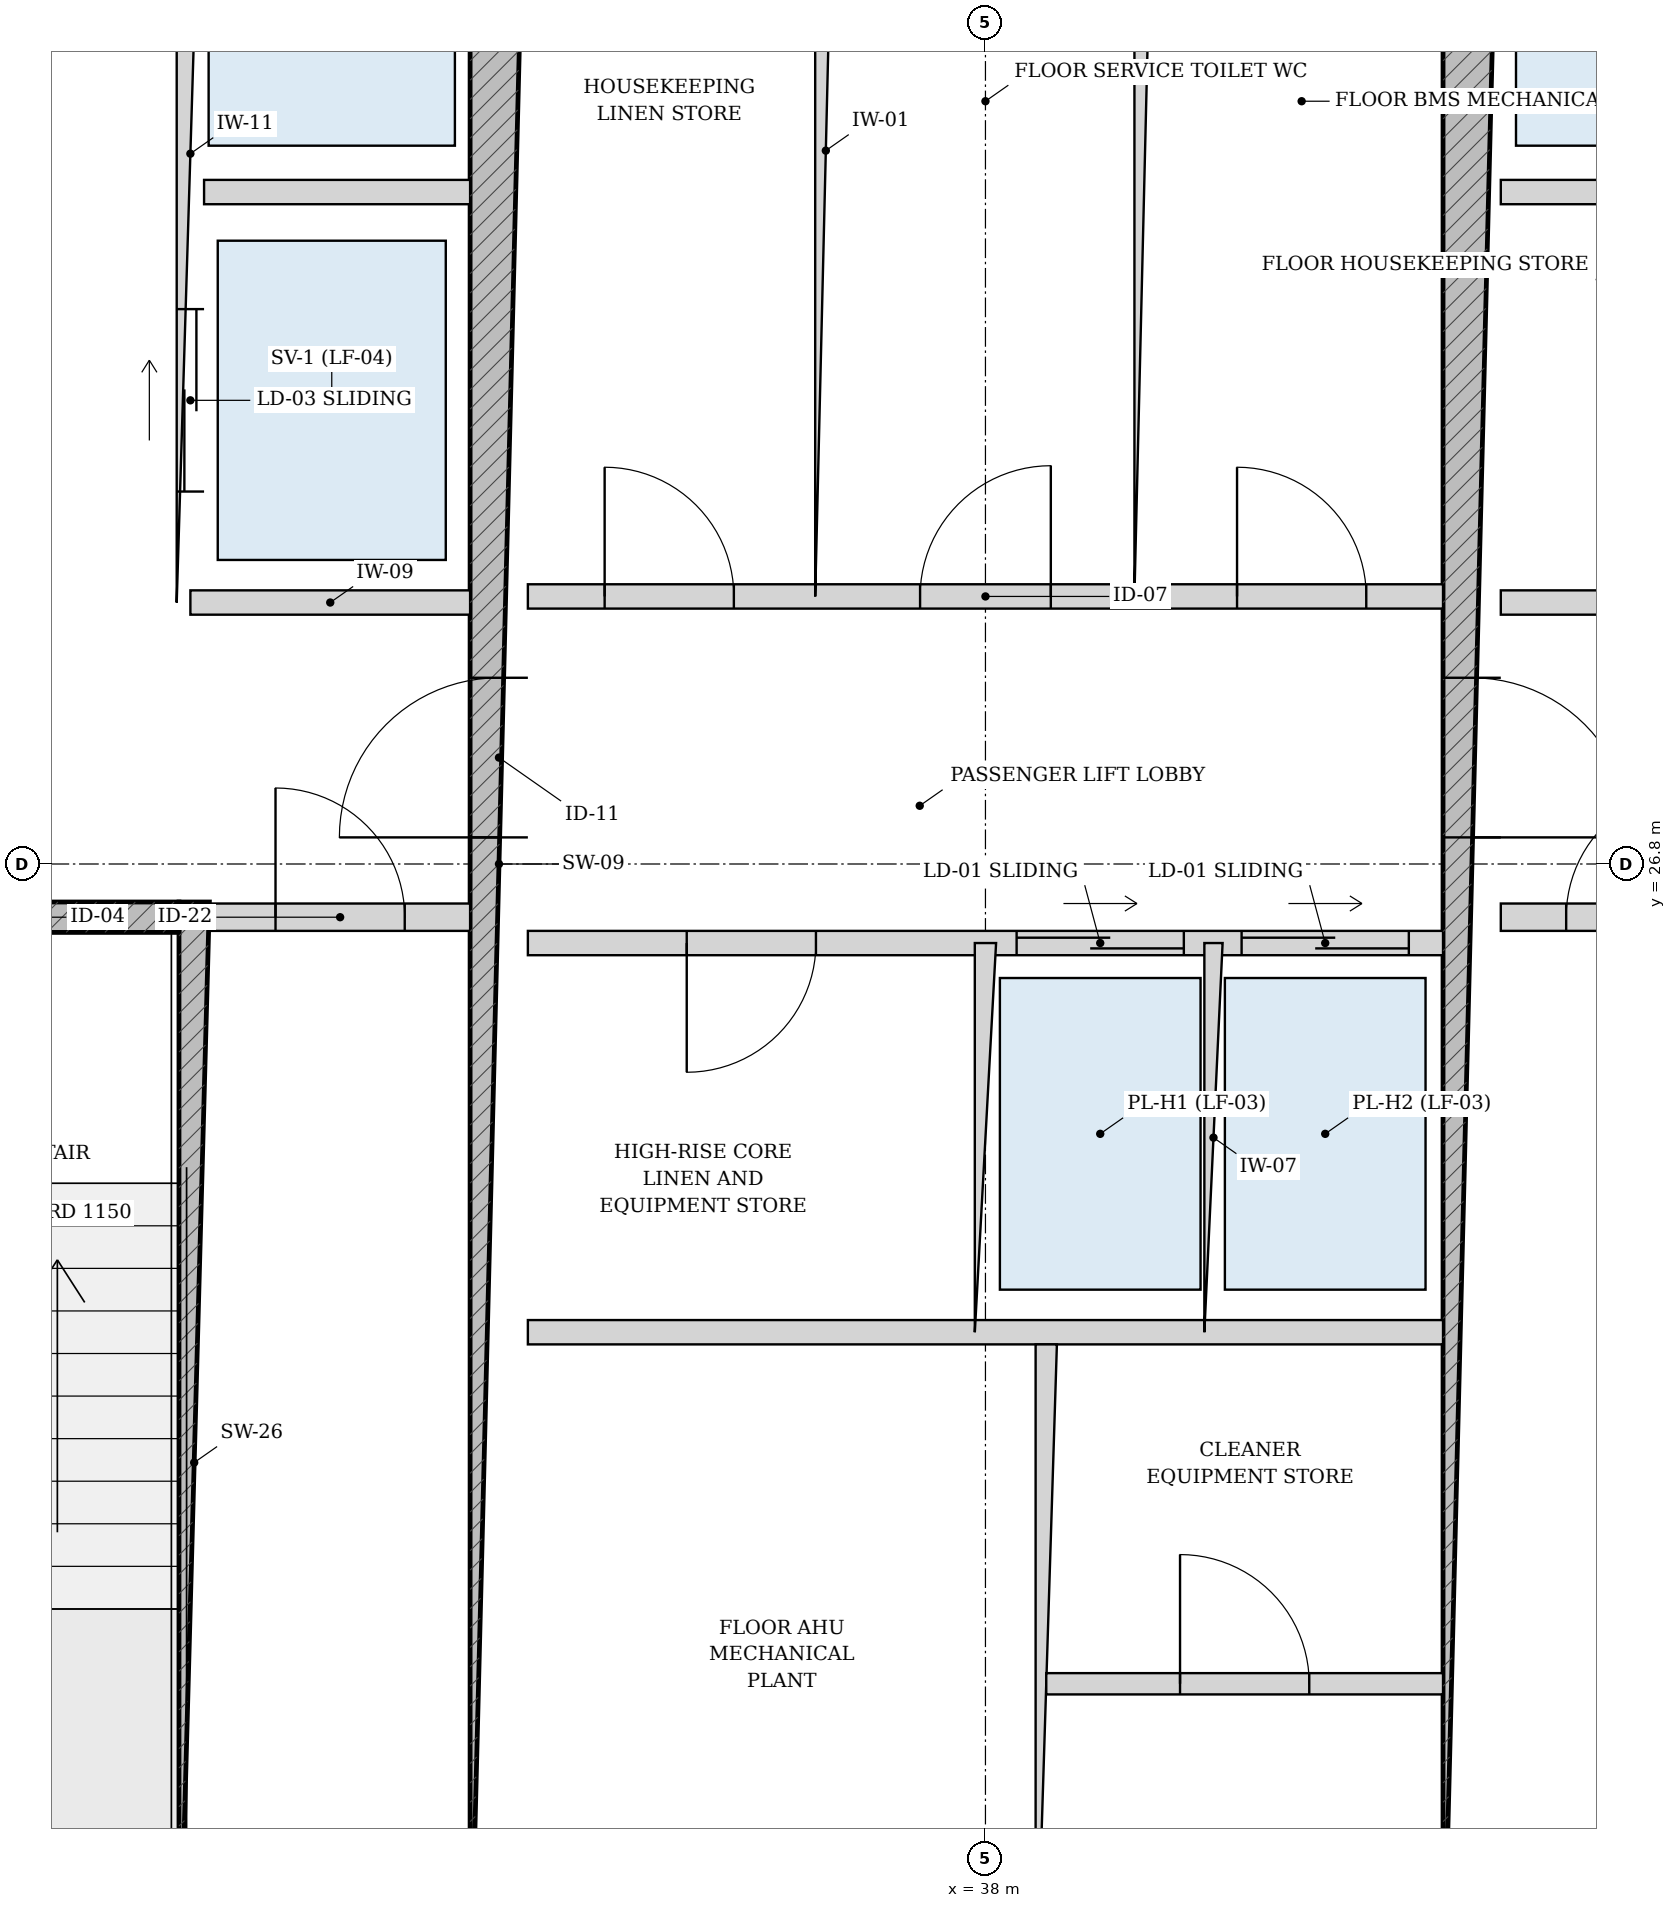
"""IFC4 building model, lengths in metres.
Left out: names, types, materials, properties, quantities, classifications, styles, units other than length and angle.
Written with IfcOpenShell. Run it as: python <this file> out.ifc"""

import sys

from ifc_helpers import new_model, si_unit, direction, frame, frame_2d, origin, place, context, subcontext, project, spatial, rectangle, extrude, source, transform, mapped, element, fill, save


model = new_model("IFC4")
c1 = context("Model", 3, precision=1e-05, world=origin(), true_north=direction((-0.2419218956, 0.970295726276)))
c2 = subcontext(c1, "Body", "Model", "MODEL_VIEW")
j1 = project(units=[si_unit("LENGTHUNIT", "METRE"), si_unit("PLANEANGLEUNIT", "RADIAN")], contexts=[c1])
p1 = place(None, origin())
s1 = spatial("IfcSite", under=j1, at=p1, CompositionType="ELEMENT")
p2 = place(p1, origin())
s2 = spatial("IfcBuilding", under=s1, at=p2, CompositionType="ELEMENT")
p3 = place(p2, frame((0.0, 0.0, 251.95)))
s3 = spatial("IfcBuildingStorey", under=s2, at=p3, CompositionType="ELEMENT", Elevation=251.95)
p4 = place(p3, frame((32.795, 19.175, 0.0), z_axis=(0.0, 0.0, 1.0), x_axis=(0.0, 1.0, 0.0)))
e1 = element("IfcWall", 1, at=p4, inside=s3, PredefinedType="SOLIDWALL", context=c2, shape_type="SweptSolid", body=[
    extrude(rectangle(XDim=7.375, YDim=0.2, at=frame_2d((3.688, 0.0))), origin(), (0.0, 0.0, 1.0), 3.49),
])
p5 = place(p3, frame((29.375, 26.45, 0.0), z_axis=(0.0, 0.0, 1.0), x_axis=(1.0, 0.0, 0.0)))
e2 = element("IfcWall", 2, at=p5, inside=s3, PredefinedType="SOLIDWALL", context=c2, shape_type="SweptSolid", body=[
    extrude(rectangle(XDim=3.32, YDim=0.2, at=frame_2d((1.66, 0.0))), origin(), (0.0, 0.0, 1.0), 3.49),
])
p6 = place(p5, frame((1.185, 0.0, 0.0)))
e3 = element("IfcOpeningElement", 3, at=p6, cuts=e2, PredefinedType="OPENING", context=c2, shape_type="SweptSolid", body=[
    extrude(rectangle(XDim=0.95, YDim=2.15, at=frame_2d((0.475, 1.075))), frame((0.0, 0.11, 0.0), z_axis=(0.0, -1.0, 0.0), x_axis=(1.0, 0.0, 0.0)), (0.0, 0.0, 1.0), 0.22),
])
p7 = place(p3, frame((34.8, 19.175, 0.0), z_axis=(0.0, 0.0, 1.0), x_axis=(0.0, 1.0, 0.0)))
e4 = element("IfcWall", 4, at=p7, inside=s3, PredefinedType="SHEAR", context=c2, shape_type="SweptSolid", body=[
    extrude(rectangle(XDim=15.25, YDim=0.38, at=frame_2d((7.625, 0.0))), origin(), (0.0, 0.0, 1.0), 3.49),
])
p8 = place(p7, frame((7.8, 0.0, 0.0)))
e5 = element("IfcOpeningElement", 5, at=p8, cuts=e4, PredefinedType="OPENING", context=c2, shape_type="SweptSolid", body=[
    extrude(rectangle(XDim=1.05, YDim=2.15, at=frame_2d((0.525, 1.075))), frame((0.0, 0.2, 0.0), z_axis=(0.0, -1.0, 0.0), x_axis=(1.0, 0.0, 0.0)), (0.0, 0.0, 1.0), 0.4),
])
p9 = place(p3, frame((41.2, 19.175, 0.0), z_axis=(0.0, 0.0, 1.0), x_axis=(0.0, 1.0, 0.0)))
e6 = element("IfcWall", 6, at=p9, inside=s3, PredefinedType="SHEAR", context=c2, shape_type="SweptSolid", body=[
    extrude(rectangle(XDim=15.25, YDim=0.38, at=frame_2d((7.625, 0.0))), origin(), (0.0, 0.0, 1.0), 3.49),
])
p10 = place(p9, frame((7.8, 0.0, 0.0)))
e7 = element("IfcOpeningElement", 7, at=p10, cuts=e6, PredefinedType="OPENING", context=c2, shape_type="SweptSolid", body=[
    extrude(rectangle(XDim=1.05, YDim=2.15, at=frame_2d((0.525, 1.075))), frame((0.0, 0.2, 0.0), z_axis=(0.0, -1.0, 0.0), x_axis=(1.0, 0.0, 0.0)), (0.0, 0.0, 1.0), 0.4),
])
p11 = place(p3, frame((32.9, 26.45, 0.0), z_axis=(0.0, 0.0, 1.0), x_axis=(1.0, 0.0, 0.0)))
e8 = element("IfcWall", 8, at=p11, inside=s3, PredefinedType="PARTITIONING", context=c2, shape_type="SweptSolid", body=[
    extrude(rectangle(XDim=1.71, YDim=0.18, at=frame_2d((0.855, 0.0))), origin(), (0.0, 0.0, 1.0), 3.49),
])
p12 = place(p11, frame((0.43, 0.0, 0.0)))
e9 = element("IfcOpeningElement", 9, at=p12, cuts=e8, PredefinedType="OPENING", context=c2, shape_type="SweptSolid", body=[
    extrude(rectangle(XDim=0.85, YDim=2.1, at=frame_2d((0.425, 1.05))), frame((0.0, 0.1, 0.0), z_axis=(0.0, -1.0, 0.0), x_axis=(1.0, 0.0, 0.0)), (0.0, 0.0, 1.0), 0.2),
])
p13 = place(p3, frame((41.39, 26.45, 0.0), z_axis=(0.0, 0.0, 1.0), x_axis=(1.0, 0.0, 0.0)))
e10 = element("IfcWall", 10, at=p13, inside=s3, PredefinedType="PARTITIONING", context=c2, shape_type="SweptSolid", body=[
    extrude(rectangle(XDim=1.71, YDim=0.18, at=frame_2d((0.855, 0.0))), origin(), (0.0, 0.0, 1.0), 3.49),
])
p14 = place(p13, frame((0.43, 0.0, 0.0)))
e11 = element("IfcOpeningElement", 11, at=p14, cuts=e10, PredefinedType="OPENING", context=c2, shape_type="SweptSolid", body=[
    extrude(rectangle(XDim=0.85, YDim=2.1, at=frame_2d((0.425, 1.05))), frame((0.0, 0.1, 0.0), z_axis=(0.0, -1.0, 0.0), x_axis=(1.0, 0.0, 0.0)), (0.0, 0.0, 1.0), 0.2),
])
p15 = place(p3, frame((32.77, 28.52, 0.0), z_axis=(0.0, 0.0, 1.0), x_axis=(0.0, 1.0, 0.0)))
e12 = element("IfcWall", 12, at=p15, inside=s3, PredefinedType="PARTITIONING", context=c2, shape_type="SweptSolid", body=[
    extrude(rectangle(XDim=5.905, YDim=0.18, at=frame_2d((2.953, 0.0))), origin(), (0.0, 0.0, 1.0), 3.49),
])
p16 = place(p15, frame((3.655, 0.0, 0.0)))
e13 = element("IfcOpeningElement", 13, at=p16, cuts=e12, PredefinedType="OPENING", context=c2, shape_type="SweptSolid", body=[
    extrude(rectangle(XDim=1.15, YDim=2.2, at=frame_2d((0.575, 1.1))), frame((0.0, 0.1, 0.0), z_axis=(0.0, -1.0, 0.0), x_axis=(1.0, 0.0, 0.0)), (0.0, 0.0, 1.0), 0.2),
])
p17 = place(p15, frame((0.73, 0.0, 0.0)))
e14 = element("IfcOpeningElement", 14, at=p17, cuts=e12, PredefinedType="OPENING", context=c2, shape_type="SweptSolid", body=[
    extrude(rectangle(XDim=1.2, YDim=2.25, at=frame_2d((0.6, 1.125))), frame((0.0, 0.1, 0.0), z_axis=(0.0, -1.0, 0.0), x_axis=(1.0, 0.0, 0.0)), (0.0, 0.0, 1.0), 0.2),
])
p18 = place(p3, frame((32.86, 31.22, 0.0), z_axis=(0.0, 0.0, 1.0), x_axis=(1.0, 0.0, 0.0)))
e15 = element("IfcWall", 15, at=p18, inside=s3, PredefinedType="PARTITIONING", context=c2, shape_type="SweptSolid", body=[
    extrude(rectangle(XDim=1.75, YDim=0.16, at=frame_2d((0.875, 0.0))), origin(), (0.0, 0.0, 1.0), 3.49),
])
p19 = place(p3, frame((32.77, 28.52, 0.0), z_axis=(0.0, 0.0, 1.0), x_axis=(1.0, 0.0, 0.0)))
e16 = element("IfcWall", 16, at=p19, inside=s3, PredefinedType="PARTITIONING", context=c2, shape_type="SweptSolid", body=[
    extrude(rectangle(XDim=1.84, YDim=0.16, at=frame_2d((0.92, 0.0))), origin(), (0.0, 0.0, 1.0), 3.49),
])
p20 = place(p3, frame((41.39, 31.22, 0.0), z_axis=(0.0, 0.0, 1.0), x_axis=(1.0, 0.0, 0.0)))
e17 = element("IfcWall", 17, at=p20, inside=s3, PredefinedType="PARTITIONING", context=c2, shape_type="SweptSolid", body=[
    extrude(rectangle(XDim=1.75, YDim=0.16, at=frame_2d((0.875, 0.0))), origin(), (0.0, 0.0, 1.0), 3.49),
])
p21 = place(p3, frame((41.39, 28.52, 0.0), z_axis=(0.0, 0.0, 1.0), x_axis=(1.0, 0.0, 0.0)))
e18 = element("IfcWall", 18, at=p21, inside=s3, PredefinedType="PARTITIONING", context=c2, shape_type="SweptSolid", body=[
    extrude(rectangle(XDim=1.84, YDim=0.16, at=frame_2d((0.92, 0.0))), origin(), (0.0, 0.0, 1.0), 3.49),
])
p22 = place(p3, frame((34.99, 28.56, 0.0), z_axis=(0.0, 0.0, 1.0), x_axis=(1.0, 0.0, 0.0)))
e19 = element("IfcWall", 19, at=p22, inside=s3, PredefinedType="PARTITIONING", context=c2, shape_type="SweptSolid", body=[
    extrude(rectangle(XDim=6.02, YDim=0.16, at=frame_2d((3.01, 0.0))), origin(), (0.0, 0.0, 1.0), 3.49),
])
p23 = place(p22, frame((0.505, 0.0, 0.0)))
e20 = element("IfcOpeningElement", 20, at=p23, cuts=e19, PredefinedType="OPENING", context=c2, shape_type="SweptSolid", body=[
    extrude(rectangle(XDim=0.85, YDim=2.1, at=frame_2d((0.425, 1.05))), frame((0.0, 0.09, 0.0), z_axis=(0.0, -1.0, 0.0), x_axis=(1.0, 0.0, 0.0)), (0.0, 0.0, 1.0), 0.18),
])
p24 = place(p22, frame((2.58, 0.0, 0.0)))
e21 = element("IfcOpeningElement", 21, at=p24, cuts=e19, PredefinedType="OPENING", context=c2, shape_type="SweptSolid", body=[
    extrude(rectangle(XDim=0.86, YDim=2.1, at=frame_2d((0.43, 1.05))), frame((0.0, 0.09, 0.0), z_axis=(0.0, -1.0, 0.0), x_axis=(1.0, 0.0, 0.0)), (0.0, 0.0, 1.0), 0.18),
])
p25 = place(p22, frame((4.665, 0.0, 0.0)))
e22 = element("IfcOpeningElement", 22, at=p25, cuts=e19, PredefinedType="OPENING", context=c2, shape_type="SweptSolid", body=[
    extrude(rectangle(XDim=0.85, YDim=2.1, at=frame_2d((0.425, 1.05))), frame((0.0, 0.09, 0.0), z_axis=(0.0, -1.0, 0.0), x_axis=(1.0, 0.0, 0.0)), (0.0, 0.0, 1.0), 0.18),
])
for number, where, z_axis, x_axis in (
    (23, (36.95, 28.56, 0.0), (0.0, 0.0, 1.0), (0.0, 1.0, 0.0)),
    (24, (39.05, 28.56, 0.0), (0.0, 0.0, 1.0), (0.0, 1.0, 0.0)),
):
    element("IfcWall", number, at=place(p3, frame(where, z_axis=z_axis, x_axis=x_axis)), inside=s3, PredefinedType="PARTITIONING", context=c2, shape_type="SweptSolid", body=[
        extrude(rectangle(XDim=5.865, YDim=0.14, at=frame_2d((2.933, 0.0))), origin(), (0.0, 0.0, 1.0), 3.49),
    ])
p26 = place(p3, frame((34.99, 26.28, 0.0), z_axis=(0.0, 0.0, 1.0), x_axis=(1.0, 0.0, 0.0)))
e25 = element("IfcWall", 25, at=p26, inside=s3, PredefinedType="PARTITIONING", context=c2, shape_type="SweptSolid", body=[
    extrude(rectangle(XDim=6.02, YDim=0.16, at=frame_2d((3.01, 0.0))), origin(), (0.0, 0.0, 1.0), 3.49),
])
p27 = place(p26, frame((1.045, 0.0, 0.0)))
e26 = element("IfcOpeningElement", 26, at=p27, cuts=e25, PredefinedType="OPENING", context=c2, shape_type="SweptSolid", body=[
    extrude(rectangle(XDim=0.85, YDim=2.1, at=frame_2d((0.425, 1.05))), frame((0.0, 0.09, 0.0), z_axis=(0.0, -1.0, 0.0), x_axis=(1.0, 0.0, 0.0)), (0.0, 0.0, 1.0), 0.18),
])
p28 = place(p26, frame((3.215, 0.0, 0.0)))
e27 = element("IfcOpeningElement", 27, at=p28, cuts=e25, PredefinedType="OPENING", context=c2, shape_type="SweptSolid", body=[
    extrude(rectangle(XDim=1.1, YDim=2.2, at=frame_2d((0.55, 1.1))), frame((0.0, 0.09, 0.0), z_axis=(0.0, -1.0, 0.0), x_axis=(1.0, 0.0, 0.0)), (0.0, 0.0, 1.0), 0.18),
])
p29 = place(p26, frame((4.695, 0.0, 0.0)))
e28 = element("IfcOpeningElement", 28, at=p29, cuts=e25, PredefinedType="OPENING", context=c2, shape_type="SweptSolid", body=[
    extrude(rectangle(XDim=1.1, YDim=2.2, at=frame_2d((0.55, 1.1))), frame((0.0, 0.09, 0.0), z_axis=(0.0, -1.0, 0.0), x_axis=(1.0, 0.0, 0.0)), (0.0, 0.0, 1.0), 0.18),
])
p30 = place(p3, frame((34.99, 23.72, 0.0), z_axis=(0.0, 0.0, 1.0), x_axis=(1.0, 0.0, 0.0)))
e29 = element("IfcWall", 29, at=p30, inside=s3, PredefinedType="PARTITIONING", context=c2, shape_type="SweptSolid", body=[
    extrude(rectangle(XDim=6.02, YDim=0.16, at=frame_2d((3.01, 0.0))), origin(), (0.0, 0.0, 1.0), 3.49),
])
p31 = place(p3, frame((38.0, 23.72, 0.0), z_axis=(0.0, 0.0, 1.0), x_axis=(0.0, 1.0, 0.0)))
e30 = element("IfcWall", 30, at=p31, inside=s3, PredefinedType="PARTITIONING", context=c2, shape_type="SweptSolid", body=[
    extrude(rectangle(XDim=2.56, YDim=0.14, at=frame_2d((1.28, 0.0))), origin(), (0.0, 0.0, 1.0), 3.49),
])
p32 = place(p3, frame((39.5, 23.72, 0.0), z_axis=(0.0, 0.0, 1.0), x_axis=(0.0, 1.0, 0.0)))
e31 = element("IfcWall", 31, at=p32, inside=s3, PredefinedType="PARTITIONING", context=c2, shape_type="SweptSolid", body=[
    extrude(rectangle(XDim=2.56, YDim=0.12, at=frame_2d((1.28, 0.0))), origin(), (0.0, 0.0, 1.0), 3.49),
])
p33 = place(p3, frame((38.4, 19.175, 0.0), z_axis=(0.0, 0.0, 1.0), x_axis=(0.0, 1.0, 0.0)))
e32 = element("IfcWall", 32, at=p33, inside=s3, PredefinedType="PARTITIONING", context=c2, shape_type="SweptSolid", body=[
    extrude(rectangle(XDim=4.465, YDim=0.14, at=frame_2d((2.232, 0.0))), origin(), (0.0, 0.0, 1.0), 3.49),
])
p34 = place(p3, frame((38.4, 21.407, 0.0), z_axis=(0.0, 0.0, 1.0), x_axis=(1.0, 0.0, 0.0)))
e33 = element("IfcWall", 33, at=p34, inside=s3, PredefinedType="PARTITIONING", context=c2, shape_type="SweptSolid", body=[
    extrude(rectangle(XDim=2.61, YDim=0.14, at=frame_2d((1.305, 0.0))), origin(), (0.0, 0.0, 1.0), 3.49),
])
p35 = place(p34, frame((0.88, 0.0, 0.0)))
e34 = element("IfcOpeningElement", 34, at=p35, cuts=e33, PredefinedType="OPENING", context=c2, shape_type="SweptSolid", body=[
    extrude(rectangle(XDim=0.85, YDim=2.1, at=frame_2d((0.425, 1.05))), frame((0.0, 0.08, 0.0), z_axis=(0.0, -1.0, 0.0), x_axis=(1.0, 0.0, 0.0)), (0.0, 0.0, 1.0), 0.16),
])
m1 = source(origin(), c2, "Body", "SweptSolid", [
    extrude(rectangle(XDim=1.05, YDim=2.15, at=frame_2d((0.525, 1.075))), frame((0.0, 0.025, 0.0), z_axis=(0.0, -1.0, 0.0), x_axis=(1.0, 0.0, 0.0)), (0.0, 0.0, 1.0), 0.05),
])
p36 = place(p8, origin())
e35 = element("IfcDoor", 35, at=p36, inside=s3, OperationType="SINGLE_SWING_LEFT", PredefinedType="DOOR", context=c2, shape_type="MappedRepresentation", body=[
    mapped(m1, transform((0.0, 0.0, 0.0), scale=1.0)),
])
fill(e5, e35)
p37 = place(p10, frame((1.05, 0.0, 0.0), z_axis=(0.0, 0.0, 1.0), x_axis=(-1.0, 0.0, 0.0)))
e36 = element("IfcDoor", 36, at=p37, inside=s3, OperationType="SINGLE_SWING_RIGHT", PredefinedType="DOOR", context=c2, shape_type="MappedRepresentation", body=[
    mapped(m1, transform((0.0, 0.0, 0.0), scale=1.0)),
])
fill(e7, e36)
m2 = source(origin(), c2, "Body", "SweptSolid", [
    extrude(rectangle(XDim=0.85, YDim=2.1, at=frame_2d((0.425, 1.05))), frame((0.0, 0.025, 0.0), z_axis=(0.0, -1.0, 0.0), x_axis=(1.0, 0.0, 0.0)), (0.0, 0.0, 1.0), 0.05),
])
p38 = place(p12, origin())
e37 = element("IfcDoor", 37, at=p38, inside=s3, OperationType="SINGLE_SWING_LEFT", PredefinedType="DOOR", context=c2, shape_type="MappedRepresentation", body=[
    mapped(m2, transform((0.0, 0.0, 0.0), scale=1.0)),
])
fill(e9, e37)
p39 = place(p14, origin())
e38 = element("IfcDoor", 38, at=p39, inside=s3, OperationType="SINGLE_SWING_RIGHT", PredefinedType="DOOR", context=c2, shape_type="MappedRepresentation", body=[
    mapped(m2, transform((0.0, 0.0, 0.0), scale=1.0)),
])
fill(e11, e38)
p40 = place(p23, origin())
e39 = element("IfcDoor", 39, at=p40, inside=s3, OperationType="SINGLE_SWING_LEFT", PredefinedType="DOOR", context=c2, shape_type="MappedRepresentation", body=[
    mapped(m2, transform((0.0, 0.0, 0.0), scale=1.0)),
])
fill(e20, e39)
m3 = source(origin(), c2, "Body", "SweptSolid", [
    extrude(rectangle(XDim=0.86, YDim=2.1, at=frame_2d((0.43, 1.05))), frame((0.0, 0.025, 0.0), z_axis=(0.0, -1.0, 0.0), x_axis=(1.0, 0.0, 0.0)), (0.0, 0.0, 1.0), 0.05),
])
p41 = place(p24, origin())
e40 = element("IfcDoor", 40, at=p41, inside=s3, OperationType="SINGLE_SWING_RIGHT", PredefinedType="DOOR", context=c2, shape_type="MappedRepresentation", body=[
    mapped(m3, transform((0.0, 0.0, 0.0), scale=1.0)),
])
fill(e21, e40)
p42 = place(p25, origin())
e41 = element("IfcDoor", 41, at=p42, inside=s3, OperationType="SINGLE_SWING_LEFT", PredefinedType="DOOR", context=c2, shape_type="MappedRepresentation", body=[
    mapped(m2, transform((0.0, 0.0, 0.0), scale=1.0)),
])
fill(e22, e41)
p43 = place(p27, frame((0.85, 0.0, 0.0), z_axis=(0.0, 0.0, 1.0), x_axis=(-1.0, 0.0, 0.0)))
e42 = element("IfcDoor", 42, at=p43, inside=s3, OperationType="SINGLE_SWING_RIGHT", PredefinedType="DOOR", context=c2, shape_type="MappedRepresentation", body=[
    mapped(m2, transform((0.0, 0.0, 0.0), scale=1.0)),
])
fill(e26, e42)
p44 = place(p35, origin())
e43 = element("IfcDoor", 43, at=p44, inside=s3, OperationType="SINGLE_SWING_LEFT", PredefinedType="DOOR", context=c2, shape_type="MappedRepresentation", body=[
    mapped(m2, transform((0.0, 0.0, 0.0), scale=1.0)),
])
fill(e34, e43)
m4 = source(origin(), c2, "Body", "SweptSolid", [
    extrude(rectangle(XDim=1.2, YDim=2.25, at=frame_2d((0.6, 1.125))), frame((0.0, 0.025, 0.0), z_axis=(0.0, -1.0, 0.0), x_axis=(1.0, 0.0, 0.0)), (0.0, 0.0, 1.0), 0.05),
])
p45 = place(p17, origin())
e44 = element("IfcDoor", 44, at=p45, inside=s3, OperationType="DOUBLE_DOOR_SLIDING", PredefinedType="DOOR", context=c2, shape_type="MappedRepresentation", body=[
    mapped(m4, transform((0.0, 0.0, 0.0), scale=1.0)),
])
fill(e14, e44)
m5 = source(origin(), c2, "Body", "SweptSolid", [
    extrude(rectangle(XDim=1.1, YDim=2.2, at=frame_2d((0.55, 1.1))), frame((0.0, 0.025, 0.0), z_axis=(0.0, -1.0, 0.0), x_axis=(1.0, 0.0, 0.0)), (0.0, 0.0, 1.0), 0.05),
])
p46 = place(p28, origin())
e45 = element("IfcDoor", 45, at=p46, inside=s3, OperationType="DOUBLE_DOOR_SLIDING", PredefinedType="DOOR", context=c2, shape_type="MappedRepresentation", body=[
    mapped(m5, transform((0.0, 0.0, 0.0), scale=1.0)),
])
fill(e27, e45)
p47 = place(p29, origin())
e46 = element("IfcDoor", 46, at=p47, inside=s3, OperationType="DOUBLE_DOOR_SLIDING", PredefinedType="DOOR", context=c2, shape_type="MappedRepresentation", body=[
    mapped(m5, transform((0.0, 0.0, 0.0), scale=1.0)),
])
fill(e28, e46)
save(model, sys.argv[1])
